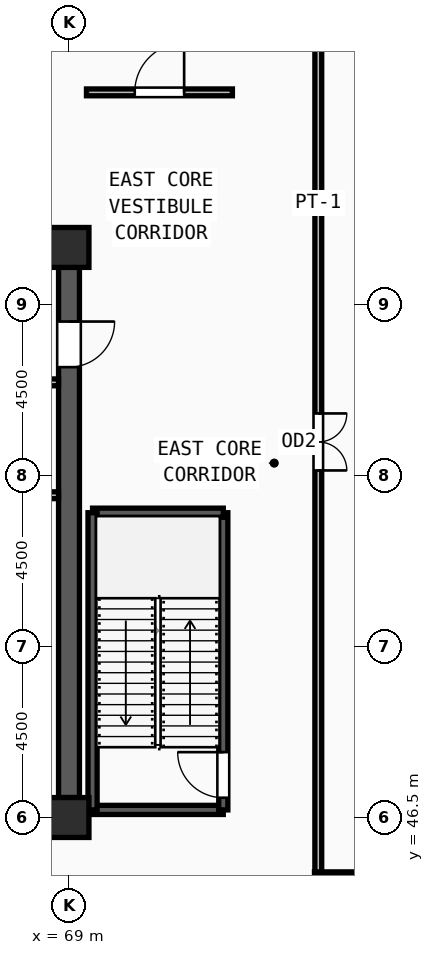
"""IFC4 building model, lengths in metres.
Left out: names, types, materials, properties, quantities, classifications, styles, units other than length and angle.
Written with IfcOpenShell. Run it as: python <this file> out.ifc"""

import sys

from ifc_helpers import new_model, si_unit, direction, frame, frame_2d, origin, origin_2d, place, context, subcontext, project, spatial, rectangle, extrude, source, transform, mapped, element, fill, save


model = new_model("IFC4")
c1 = context("Model", 3, precision=1e-05, world=origin(), true_north=direction((0.0, 1.0)))
c2 = subcontext(c1, "Body", "Model", "MODEL_VIEW")
j1 = project(units=[si_unit("LENGTHUNIT", "METRE"), si_unit("PLANEANGLEUNIT", "RADIAN")], contexts=[c1])
p1 = place(None, origin())
s1 = spatial("IfcSite", under=j1, at=p1, CompositionType="ELEMENT")
p2 = place(p1, origin())
s2 = spatial("IfcBuilding", under=s1, at=p2, CompositionType="ELEMENT")
p3 = place(p2, frame((0.0, 0.0, 355.8)))
s3 = spatial("IfcBuildingStorey", under=s2, at=p3, CompositionType="ELEMENT", Elevation=355.8)
m1 = source(origin(), c2, "Body", "SweptSolid", [
    extrude(rectangle(XDim=1.05, YDim=1.05, at=origin_2d()), origin(), (0.0, 0.0, 1.0), 4.8),
])
for number, where, z_axis, x_axis in (
    (1, (69.0, 46.5, 0.0), (0.0, 0.0, 1.0), (1.0, 0.0, 0.0)),
    (2, (69.0, 61.5, 0.0), (0.0, 0.0, 1.0), (1.0, 0.0, 0.0)),
):
    element("IfcColumn", number, at=place(p3, frame(where, z_axis=z_axis, x_axis=x_axis)), inside=s3, PredefinedType="COLUMN", context=c2, shape_type="MappedRepresentation", body=[
        mapped(m1, transform((0.0, 0.0, 0.0), x_axis=(1.0, 0.0, 0.0), y_axis=(0.0, 1.0, 0.0), z_axis=(0.0, 0.0, 1.0), scale=1.0)),
    ])
p4 = place(p3, frame((69.0, 60.975, 0.0), z_axis=(0.0, 0.0, 1.0), x_axis=(0.0, -1.0, 0.0)))
e3 = element("IfcWall", 3, at=p4, inside=s3, PredefinedType="SHEAR", context=c2, shape_type="SweptSolid", body=[
    extrude(rectangle(XDim=13.95, YDim=0.55, at=frame_2d((6.975, 0.0))), origin(), (0.0, 0.0, 1.0), 4.35),
])
m2 = source(origin(), c2, "Body", "SweptSolid", [
    extrude(rectangle(XDim=1.2, YDim=2.2, at=frame_2d((0.6, 1.1))), frame((0.0, 0.285, 0.0), z_axis=(0.0, -1.0, 0.0), x_axis=(1.0, 0.0, 0.0)), (0.0, 0.0, 1.0), 0.57),
])
p5 = place(p4, frame((1.425, 0.0, 0.0)))
e4 = element("IfcOpeningElement", 4, at=p5, cuts=e3, PredefinedType="OPENING", context=c2, shape_type="MappedRepresentation", body=[
    mapped(m2, transform((0.0, 0.0, 0.0), x_axis=(1.0, 0.0, 0.0), y_axis=(0.0, 1.0, 0.0), z_axis=(0.0, 0.0, 1.0), scale=1.0)),
])
p6 = place(p3, frame((69.62, 46.7, 0.0), z_axis=(0.0, 0.0, 1.0), x_axis=(1.0, 0.0, 0.0)))
e5 = element("IfcWall", 5, at=p6, inside=s3, PredefinedType="SOLIDWALL", context=c2, shape_type="SweptSolid", body=[
    extrude(rectangle(XDim=3.44, YDim=0.24, at=frame_2d((1.72, 0.0))), origin(), (0.0, 0.0, 1.0), 4.35),
])
p7 = place(p3, frame((73.06, 46.7, 0.0), z_axis=(0.0, 0.0, 1.0), x_axis=(0.0, 1.0, 0.0)))
e6 = element("IfcWall", 6, at=p7, inside=s3, PredefinedType="SOLIDWALL", context=c2, shape_type="SweptSolid", body=[
    extrude(rectangle(XDim=7.82, YDim=0.24, at=frame_2d((3.91, 0.0))), origin(), (0.0, 0.0, 1.0), 4.35),
])
m3 = source(origin(), c2, "Body", "SweptSolid", [
    extrude(rectangle(XDim=1.2, YDim=2.2, at=frame_2d((0.6, 1.1))), frame((0.0, 0.13, 0.0), z_axis=(0.0, -1.0, 0.0), x_axis=(1.0, 0.0, 0.0)), (0.0, 0.0, 1.0), 0.26),
])
p8 = place(p7, frame((0.32, 0.0, 0.0)))
e7 = element("IfcOpeningElement", 7, at=p8, cuts=e6, PredefinedType="OPENING", context=c2, shape_type="MappedRepresentation", body=[
    mapped(m3, transform((0.0, 0.0, 0.0), x_axis=(1.0, 0.0, 0.0), y_axis=(0.0, 1.0, 0.0), z_axis=(0.0, 0.0, 1.0), scale=1.0)),
])
p9 = place(p3, frame((73.06, 54.52, 0.0), z_axis=(0.0, 0.0, 1.0), x_axis=(-1.0, 0.0, 0.0)))
e8 = element("IfcWall", 8, at=p9, inside=s3, PredefinedType="SOLIDWALL", context=c2, shape_type="SweptSolid", body=[
    extrude(rectangle(XDim=3.44, YDim=0.24, at=frame_2d((1.72, 0.0))), origin(), (0.0, 0.0, 1.0), 4.35),
])
p10 = place(p3, frame((69.62, 54.52, 0.0), z_axis=(0.0, 0.0, 1.0), x_axis=(0.0, -1.0, 0.0)))
e9 = element("IfcWall", 9, at=p10, inside=s3, PredefinedType="SOLIDWALL", context=c2, shape_type="SweptSolid", body=[
    extrude(rectangle(XDim=7.82, YDim=0.24, at=frame_2d((3.91, 0.0))), origin(), (0.0, 0.0, 1.0), 4.35),
])
p11 = place(p3, frame((66.39, 54.98, 0.0), z_axis=(0.0, 0.0, 1.0), x_axis=(1.0, 0.0, 0.0)))
e10 = element("IfcWall", 10, at=p11, inside=s3, PredefinedType="PARTITIONING", context=c2, shape_type="SweptSolid", body=[
    extrude(rectangle(XDim=2.335, YDim=0.18, at=frame_2d((1.167, 0.0))), origin(), (0.0, 0.0, 1.0), 4.35),
])
m4 = source(origin(), c2, "Body", "SweptSolid", [
    extrude(rectangle(XDim=0.85, YDim=2.1, at=frame_2d((0.425, 1.05))), frame((0.0, 0.1, 0.0), z_axis=(0.0, -1.0, 0.0), x_axis=(1.0, 0.0, 0.0)), (0.0, 0.0, 1.0), 0.2),
])
p12 = place(p11, frame((0.65, 0.0, 0.0)))
e11 = element("IfcOpeningElement", 11, at=p12, cuts=e10, PredefinedType="OPENING", context=c2, shape_type="MappedRepresentation", body=[
    mapped(m4, transform((0.0, 0.0, 0.0), x_axis=(1.0, 0.0, 0.0), y_axis=(0.0, 1.0, 0.0), z_axis=(0.0, 0.0, 1.0), scale=1.0)),
])
p13 = place(p3, frame((69.46, 65.58, 0.0), z_axis=(0.0, 0.0, 1.0), x_axis=(1.0, 0.0, 0.0)))
e12 = element("IfcWall", 12, at=p13, inside=s3, PredefinedType="PARTITIONING", context=c2, shape_type="SweptSolid", body=[
    extrude(rectangle(XDim=3.84, YDim=0.18, at=frame_2d((1.92, 0.0))), origin(), (0.0, 0.0, 1.0), 4.35),
])
m5 = source(origin(), c2, "Body", "SweptSolid", [
    extrude(rectangle(XDim=1.3, YDim=2.2, at=frame_2d((0.65, 1.1))), frame((0.0, 0.1, 0.0), z_axis=(0.0, -1.0, 0.0), x_axis=(1.0, 0.0, 0.0)), (0.0, 0.0, 1.0), 0.2),
])
p14 = place(p13, frame((1.27, 0.0, 0.0)))
e13 = element("IfcOpeningElement", 13, at=p14, cuts=e12, PredefinedType="OPENING", context=c2, shape_type="MappedRepresentation", body=[
    mapped(m5, transform((0.0, 0.0, 0.0), x_axis=(1.0, 0.0, 0.0), y_axis=(0.0, 1.0, 0.0), z_axis=(0.0, 0.0, 1.0), scale=1.0)),
])
p15 = place(p3, frame((75.56, 67.98, 0.0), z_axis=(0.0, 0.0, 1.0), x_axis=(0.0, -1.0, 0.0)))
e14 = element("IfcWall", 14, at=p15, inside=s3, PredefinedType="PARTITIONING", context=c2, shape_type="SweptSolid", body=[
    extrude(rectangle(XDim=23.195, YDim=0.18, at=frame_2d((11.598, 0.0))), origin(), (0.0, 0.0, 1.0), 4.35),
])
m6 = source(origin(), c2, "Body", "SweptSolid", [
    extrude(rectangle(XDim=1.5, YDim=2.2, at=frame_2d((0.75, 1.1))), frame((0.0, 0.1, 0.0), z_axis=(0.0, -1.0, 0.0), x_axis=(1.0, 0.0, 0.0)), (0.0, 0.0, 1.0), 0.2),
])
p16 = place(p15, frame((10.848, 0.0, 0.0)))
e15 = element("IfcOpeningElement", 15, at=p16, cuts=e14, PredefinedType="OPENING", context=c2, shape_type="MappedRepresentation", body=[
    mapped(m6, transform((0.0, 0.0, 0.0), x_axis=(1.0, 0.0, 0.0), y_axis=(0.0, 1.0, 0.0), z_axis=(0.0, 0.0, 1.0), scale=1.0)),
])
p17 = place(p3, frame((75.46, 45.0, 0.0), z_axis=(0.0, 0.0, 1.0), x_axis=(1.0, 0.0, 0.0)))
e16 = element("IfcWall", 16, at=p17, inside=s3, PredefinedType="PARTITIONING", context=c2, shape_type="SweptSolid", body=[
    extrude(rectangle(XDim=4.003, YDim=0.14, at=frame_2d((2.001, 0.0))), origin(), (0.0, 0.0, 1.0), 4.35),
])
p18 = place(p3, frame((67.4, 57.95, 0.0), z_axis=(0.0, 0.0, 1.0), x_axis=(1.0, 0.0, 0.0)))
e17 = element("IfcWall", 17, at=p18, inside=s3, PredefinedType="PARTITIONING", context=c2, shape_type="SweptSolid", body=[
    extrude(rectangle(XDim=1.325, YDim=0.18, at=frame_2d((0.663, 0.0))), origin(), (0.0, 0.0, 1.0), 4.35),
])
m7 = source(origin(), c2, "Body", "SweptSolid", [
    extrude(rectangle(XDim=1.2, YDim=2.2, at=frame_2d((0.6, 1.1))), frame((0.0, 0.025, 0.0), z_axis=(0.0, -1.0, 0.0), x_axis=(1.0, 0.0, 0.0)), (0.0, 0.0, 1.0), 0.05),
])
p19 = place(p5, origin())
e18 = element("IfcDoor", 18, at=p19, inside=s3, OperationType="SINGLE_SWING_LEFT", PredefinedType="DOOR", context=c2, shape_type="MappedRepresentation", body=[
    mapped(m7, transform((0.0, 0.0, 0.0), x_axis=(1.0, 0.0, 0.0), y_axis=(0.0, 1.0, 0.0), z_axis=(0.0, 0.0, 1.0), scale=1.0)),
])
fill(e4, e18)
p20 = place(p8, origin())
e19 = element("IfcDoor", 19, at=p20, inside=s3, OperationType="SINGLE_SWING_RIGHT", PredefinedType="DOOR", context=c2, shape_type="MappedRepresentation", body=[
    mapped(m7, transform((0.0, 0.0, 0.0), x_axis=(1.0, 0.0, 0.0), y_axis=(0.0, 1.0, 0.0), z_axis=(0.0, 0.0, 1.0), scale=1.0)),
])
fill(e7, e19)
m8 = source(origin(), c2, "Body", "SweptSolid", [
    extrude(rectangle(XDim=1.3, YDim=2.2, at=frame_2d((0.65, 1.1))), frame((0.0, 0.025, 0.0), z_axis=(0.0, -1.0, 0.0), x_axis=(1.0, 0.0, 0.0)), (0.0, 0.0, 1.0), 0.05),
])
p21 = place(p14, origin())
e20 = element("IfcDoor", 20, at=p21, inside=s3, OperationType="SINGLE_SWING_RIGHT", PredefinedType="DOOR", context=c2, shape_type="MappedRepresentation", body=[
    mapped(m8, transform((0.0, 0.0, 0.0), x_axis=(1.0, 0.0, 0.0), y_axis=(0.0, 1.0, 0.0), z_axis=(0.0, 0.0, 1.0), scale=1.0)),
])
fill(e13, e20)
m9 = source(origin(), c2, "Body", "SweptSolid", [
    extrude(rectangle(XDim=1.5, YDim=2.2, at=frame_2d((0.75, 1.1))), frame((0.0, 0.025, 0.0), z_axis=(0.0, -1.0, 0.0), x_axis=(1.0, 0.0, 0.0)), (0.0, 0.0, 1.0), 0.05),
])
p22 = place(p16, origin())
e21 = element("IfcDoor", 21, at=p22, inside=s3, OperationType="DOUBLE_DOOR_SINGLE_SWING", PredefinedType="DOOR", context=c2, shape_type="MappedRepresentation", body=[
    mapped(m9, transform((0.0, 0.0, 0.0), x_axis=(1.0, 0.0, 0.0), y_axis=(0.0, 1.0, 0.0), z_axis=(0.0, 0.0, 1.0), scale=1.0)),
])
fill(e15, e21)
save(model, sys.argv[1])
